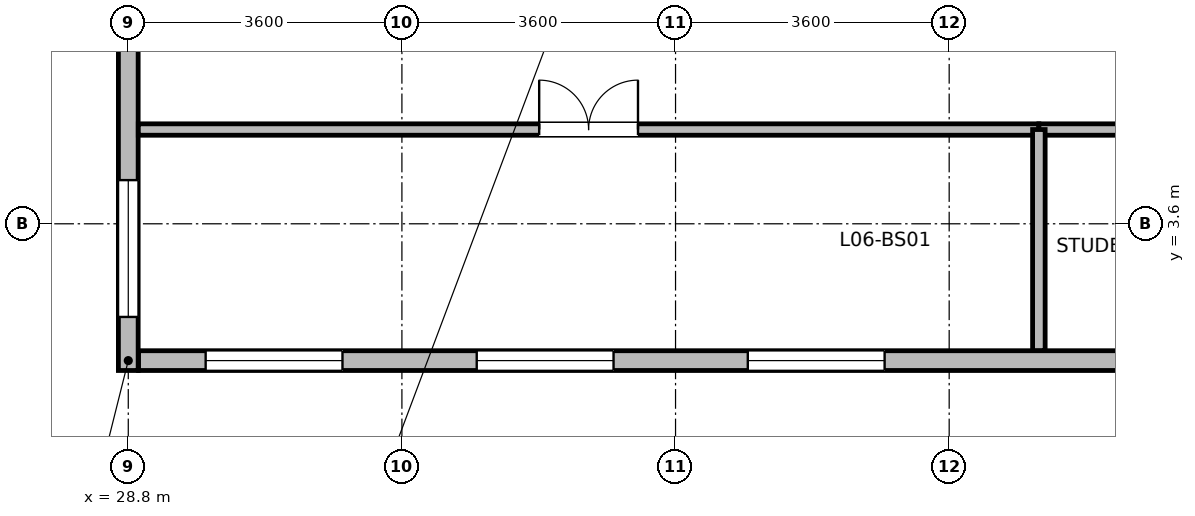
"""IFC4 building model, lengths in metres.
Left out: names, types, materials, properties, quantities, classifications, styles, units other than length and angle.
Written with IfcOpenShell. Run it as: python <this file> out.ifc"""

import sys

from ifc_helpers import new_model, si_unit, direction, frame, frame_2d, origin, place, context, subcontext, project, spatial, rectangle, extrude, element, fill, save


model = new_model("IFC4")
c1 = context("Model", 3, precision=1e-05, world=origin(), true_north=direction((0.0, 1.0)))
c2 = subcontext(c1, "Body", "Model", "MODEL_VIEW")
j1 = project(units=[si_unit("LENGTHUNIT", "METRE"), si_unit("PLANEANGLEUNIT", "RADIAN")], contexts=[c1])
p1 = place(None, origin())
s1 = spatial("IfcSite", under=j1, at=p1, CompositionType="ELEMENT")
p2 = place(p1, origin())
s2 = spatial("IfcBuilding", under=s1, at=p2, CompositionType="ELEMENT")
p3 = place(p2, frame((0.0, 0.0, 29.0)))
s3 = spatial("IfcBuildingStorey", under=s2, at=p3, CompositionType="ELEMENT", Elevation=29.0)
p4 = place(p3, frame((57.465, 1.8, 0.0), z_axis=(0.0, 0.0, 1.0), x_axis=(-1.0, 0.0, 0.0)))
e1 = element("IfcWall", 1, at=p4, inside=s3, PredefinedType="STANDARD", context=c2, shape_type="SweptSolid", body=[
    extrude(rectangle(XDim=28.53, YDim=0.26, at=frame_2d((14.265, 0.0))), origin(), (0.0, 0.0, 1.0), 3.43),
])
p5 = place(p4, frame((0.883, 0.0, 0.85)))
e2 = element("IfcOpeningElement", 2, at=p5, cuts=e1, PredefinedType="OPENING", context=c2, shape_type="SweptSolid", body=[
    extrude(rectangle(XDim=1.8, YDim=1.85, at=frame_2d((0.9, 0.925))), frame((0.0, 0.14, 0.0), z_axis=(0.0, -1.0, 0.0), x_axis=(1.0, 0.0, 0.0)), (0.0, 0.0, 1.0), 0.28),
])
p6 = place(p4, frame((4.449, 0.0, 0.85)))
e3 = element("IfcOpeningElement", 3, at=p6, cuts=e1, PredefinedType="OPENING", context=c2, shape_type="SweptSolid", body=[
    extrude(rectangle(XDim=1.8, YDim=1.85, at=frame_2d((0.9, 0.925))), frame((0.0, 0.14, 0.0), z_axis=(0.0, -1.0, 0.0), x_axis=(1.0, 0.0, 0.0)), (0.0, 0.0, 1.0), 0.28),
])
p7 = place(p4, frame((11.582, 0.0, 0.85)))
e4 = element("IfcOpeningElement", 4, at=p7, cuts=e1, PredefinedType="OPENING", context=c2, shape_type="SweptSolid", body=[
    extrude(rectangle(XDim=1.8, YDim=1.85, at=frame_2d((0.9, 0.925))), frame((0.0, 0.14, 0.0), z_axis=(0.0, -1.0, 0.0), x_axis=(1.0, 0.0, 0.0)), (0.0, 0.0, 1.0), 0.28),
])
p8 = place(p4, frame((18.714, 0.0, 0.85)))
e5 = element("IfcOpeningElement", 5, at=p8, cuts=e1, PredefinedType="OPENING", context=c2, shape_type="SweptSolid", body=[
    extrude(rectangle(XDim=1.8, YDim=1.85, at=frame_2d((0.9, 0.925))), frame((0.0, 0.14, 0.0), z_axis=(0.0, -1.0, 0.0), x_axis=(1.0, 0.0, 0.0)), (0.0, 0.0, 1.0), 0.28),
])
p9 = place(p4, frame((22.281, 0.0, 0.85)))
e6 = element("IfcOpeningElement", 6, at=p9, cuts=e1, PredefinedType="OPENING", context=c2, shape_type="SweptSolid", body=[
    extrude(rectangle(XDim=1.8, YDim=1.85, at=frame_2d((0.9, 0.925))), frame((0.0, 0.14, 0.0), z_axis=(0.0, -1.0, 0.0), x_axis=(1.0, 0.0, 0.0)), (0.0, 0.0, 1.0), 0.28),
])
p10 = place(p4, frame((25.847, 0.0, 0.85)))
e7 = element("IfcOpeningElement", 7, at=p10, cuts=e1, PredefinedType="OPENING", context=c2, shape_type="SweptSolid", body=[
    extrude(rectangle(XDim=1.8, YDim=1.85, at=frame_2d((0.9, 0.925))), frame((0.0, 0.14, 0.0), z_axis=(0.0, -1.0, 0.0), x_axis=(1.0, 0.0, 0.0)), (0.0, 0.0, 1.0), 0.28),
])
p11 = place(p3, frame((28.8, 1.67, 0.0), z_axis=(0.0, 0.0, 1.0), x_axis=(0.0, 1.0, 0.0)))
e8 = element("IfcWall", 8, at=p11, inside=s3, PredefinedType="STANDARD", context=c2, shape_type="SweptSolid", body=[
    extrude(rectangle(XDim=19.254, YDim=0.26, at=frame_2d((9.627, 0.0))), origin(), (0.0, 0.0, 1.0), 3.43),
])
p12 = place(p11, frame((0.705, 0.0, 0.85)))
e9 = element("IfcOpeningElement", 9, at=p12, cuts=e8, PredefinedType="OPENING", context=c2, shape_type="SweptSolid", body=[
    extrude(rectangle(XDim=1.8, YDim=1.85, at=frame_2d((0.9, 0.925))), frame((0.0, 0.14, 0.0), z_axis=(0.0, -1.0, 0.0), x_axis=(1.0, 0.0, 0.0)), (0.0, 0.0, 1.0), 0.28),
])
p13 = place(p11, frame((7.123, 0.0, 0.85)))
e10 = element("IfcOpeningElement", 10, at=p13, cuts=e8, PredefinedType="OPENING", context=c2, shape_type="SweptSolid", body=[
    extrude(rectangle(XDim=1.8, YDim=1.85, at=frame_2d((0.9, 0.925))), frame((0.0, 0.14, 0.0), z_axis=(0.0, -1.0, 0.0), x_axis=(1.0, 0.0, 0.0)), (0.0, 0.0, 1.0), 0.28),
])
p14 = place(p11, frame((10.332, 0.0, 0.85)))
e11 = element("IfcOpeningElement", 11, at=p14, cuts=e8, PredefinedType="OPENING", context=c2, shape_type="SweptSolid", body=[
    extrude(rectangle(XDim=1.8, YDim=1.85, at=frame_2d((0.9, 0.925))), frame((0.0, 0.14, 0.0), z_axis=(0.0, -1.0, 0.0), x_axis=(1.0, 0.0, 0.0)), (0.0, 0.0, 1.0), 0.28),
])
p15 = place(p11, frame((13.541, 0.0, 0.85)))
e12 = element("IfcOpeningElement", 12, at=p15, cuts=e8, PredefinedType="OPENING", context=c2, shape_type="SweptSolid", body=[
    extrude(rectangle(XDim=1.8, YDim=1.85, at=frame_2d((0.9, 0.925))), frame((0.0, 0.14, 0.0), z_axis=(0.0, -1.0, 0.0), x_axis=(1.0, 0.0, 0.0)), (0.0, 0.0, 1.0), 0.28),
])
p16 = place(p11, frame((16.75, 0.0, 0.85)))
e13 = element("IfcOpeningElement", 13, at=p16, cuts=e8, PredefinedType="OPENING", context=c2, shape_type="SweptSolid", body=[
    extrude(rectangle(XDim=1.8, YDim=1.85, at=frame_2d((0.9, 0.925))), frame((0.0, 0.14, 0.0), z_axis=(0.0, -1.0, 0.0), x_axis=(1.0, 0.0, 0.0)), (0.0, 0.0, 1.0), 0.28),
])
p17 = place(p3, frame((28.932, 4.84, 0.0), z_axis=(0.0, 0.0, 1.0), x_axis=(1.0, 0.0, 0.0)))
e14 = element("IfcWall", 14, at=p17, inside=s3, PredefinedType="PARTITIONING", context=c2, shape_type="SweptSolid", body=[
    extrude(rectangle(XDim=11.848, YDim=0.15, at=frame_2d((5.924, 0.0))), origin(), (0.0, 0.0, 1.0), 3.43),
])
p18 = place(p17, frame((5.274, 0.0, 0.0)))
e15 = element("IfcOpeningElement", 15, at=p18, cuts=e14, PredefinedType="OPENING", context=c2, shape_type="SweptSolid", body=[
    extrude(rectangle(XDim=1.3, YDim=2.12, at=frame_2d((0.65, 1.06))), frame((0.0, 0.085, 0.0), z_axis=(0.0, -1.0, 0.0), x_axis=(1.0, 0.0, 0.0)), (0.0, 0.0, 1.0), 0.17),
])
p19 = place(p3, frame((40.78, 4.84, 0.0), z_axis=(0.0, 0.0, 1.0), x_axis=(1.0, 0.0, 0.0)))
e16 = element("IfcWall", 16, at=p19, inside=s3, PredefinedType="PARTITIONING", context=c2, shape_type="SweptSolid", body=[
    extrude(rectangle(XDim=8.12, YDim=0.15, at=frame_2d((4.06, 0.0))), origin(), (0.0, 0.0, 1.0), 3.43),
])
p20 = place(p19, frame((3.585, 0.0, 0.0)))
e17 = element("IfcOpeningElement", 17, at=p20, cuts=e16, PredefinedType="OPENING", context=c2, shape_type="SweptSolid", body=[
    extrude(rectangle(XDim=0.95, YDim=2.1, at=frame_2d((0.475, 1.05))), frame((0.0, 0.085, 0.0), z_axis=(0.0, -1.0, 0.0), x_axis=(1.0, 0.0, 0.0)), (0.0, 0.0, 1.0), 0.17),
])
p21 = place(p3, frame((40.78, 1.932, 0.0), z_axis=(0.0, 0.0, 1.0), x_axis=(0.0, 1.0, 0.0)))
e18 = element("IfcWall", 18, at=p21, inside=s3, PredefinedType="PARTITIONING", context=c2, shape_type="SweptSolid", body=[
    extrude(rectangle(XDim=2.908, YDim=0.165, at=frame_2d((1.454, 0.0))), origin(), (0.0, 0.0, 1.0), 3.43),
])
p22 = place(p8, origin())
e19 = element("IfcWindow", 19, at=p22, inside=s3, PartitioningType="SINGLE_PANEL", PredefinedType="WINDOW", context=c2, shape_type="SweptSolid", body=[
    extrude(rectangle(XDim=1.8, YDim=1.85, at=frame_2d((0.9, 0.925))), frame((0.0, 0.03, 0.0), z_axis=(0.0, -1.0, 0.0), x_axis=(1.0, 0.0, 0.0)), (0.0, 0.0, 1.0), 0.06),
])
fill(e5, e19)
p23 = place(p9, origin())
e20 = element("IfcWindow", 20, at=p23, inside=s3, PartitioningType="SINGLE_PANEL", PredefinedType="WINDOW", context=c2, shape_type="SweptSolid", body=[
    extrude(rectangle(XDim=1.8, YDim=1.85, at=frame_2d((0.9, 0.925))), frame((0.0, 0.03, 0.0), z_axis=(0.0, -1.0, 0.0), x_axis=(1.0, 0.0, 0.0)), (0.0, 0.0, 1.0), 0.06),
])
fill(e6, e20)
p24 = place(p10, origin())
e21 = element("IfcWindow", 21, at=p24, inside=s3, PartitioningType="SINGLE_PANEL", PredefinedType="WINDOW", context=c2, shape_type="SweptSolid", body=[
    extrude(rectangle(XDim=1.8, YDim=1.85, at=frame_2d((0.9, 0.925))), frame((0.0, 0.03, 0.0), z_axis=(0.0, -1.0, 0.0), x_axis=(1.0, 0.0, 0.0)), (0.0, 0.0, 1.0), 0.06),
])
fill(e7, e21)
p25 = place(p12, origin())
e22 = element("IfcWindow", 22, at=p25, inside=s3, PartitioningType="SINGLE_PANEL", PredefinedType="WINDOW", context=c2, shape_type="SweptSolid", body=[
    extrude(rectangle(XDim=1.8, YDim=1.85, at=frame_2d((0.9, 0.925))), frame((0.0, 0.03, 0.0), z_axis=(0.0, -1.0, 0.0), x_axis=(1.0, 0.0, 0.0)), (0.0, 0.0, 1.0), 0.06),
])
fill(e9, e22)
p26 = place(p18, origin())
e23 = element("IfcDoor", 23, at=p26, inside=s3, OperationType="DOUBLE_DOOR_SINGLE_SWING", PredefinedType="DOOR", context=c2, shape_type="SweptSolid", body=[
    extrude(rectangle(XDim=1.3, YDim=2.12, at=frame_2d((0.65, 1.06))), frame((0.0, 0.025, 0.0), z_axis=(0.0, -1.0, 0.0), x_axis=(1.0, 0.0, 0.0)), (0.0, 0.0, 1.0), 0.05),
])
fill(e15, e23)
save(model, sys.argv[1])
